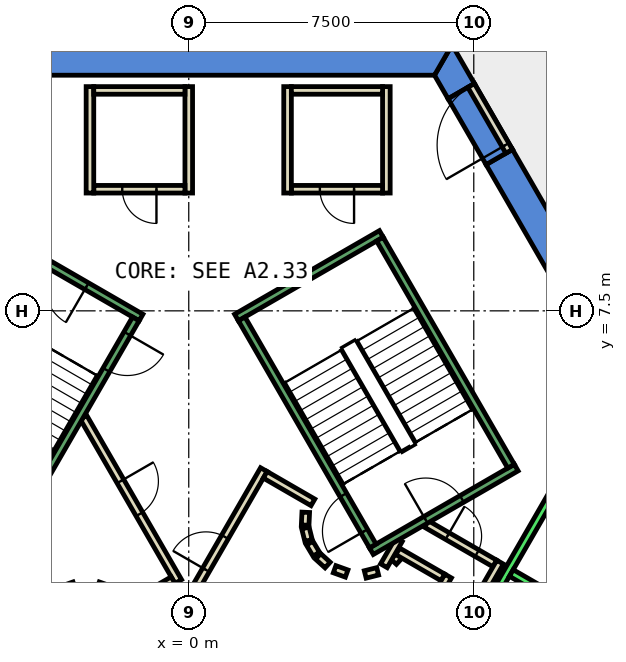
"""IFC4 building model, lengths in metres.
Left out: names, types, materials, properties, quantities, classifications, styles, units other than length and angle.
Written with IfcOpenShell. Run it as: python <this file> out.ifc"""

import sys

from ifc_helpers import new_model, si_unit, direction, frame, frame_2d, origin, place, context, subcontext, project, spatial, polyline, rectangle, outline, extrude, element, fill, save


model = new_model("IFC4")
c1 = context("Model", 3, precision=1e-05, world=origin(), true_north=direction((0.0, 1.0)))
c2 = subcontext(c1, "Body", "Model", "MODEL_VIEW")
j1 = project(units=[si_unit("LENGTHUNIT", "METRE"), si_unit("PLANEANGLEUNIT", "RADIAN")], contexts=[c1])
p1 = place(None, origin())
s1 = spatial("IfcSite", under=j1, at=p1, CompositionType="ELEMENT")
p2 = place(p1, origin())
s2 = spatial("IfcBuilding", under=s1, at=p2, CompositionType="ELEMENT")
p3 = place(p2, frame((0.0, 0.0, 163.4)))
s3 = spatial("IfcBuildingStorey", under=s2, at=p3, CompositionType="ELEMENT", Elevation=163.4)
p4 = place(p3, frame((0.0, 0.0, -0.4)))
e1 = element("IfcWall", 1, at=p4, inside=s3, PredefinedType="SHEAR", context=c2, shape_type="SweptSolid", body=[
    extrude(outline(polyline([(8.517, 11.748), (7.824, 11.348), (12.933, 2.5), (13.856, 2.5), (8.517, 11.748)])), origin(), (0.0, 0.0, 1.0), 4.2),
])
p5 = place(p3, frame((0.0, 0.0, -0.4)))
e2 = element("IfcWall", 2, at=p5, inside=s3, PredefinedType="SHEAR", context=c2, shape_type="SweptSolid", body=[
    extrude(outline(polyline([(6.824, 13.08), (7.517, 13.48), (6.928, 14.5), (6.466, 13.7), (6.824, 13.08)])), origin(), (0.0, 0.0, 1.0), 4.2),
])
p6 = place(p3, frame((0.0, 0.0, 3.6)))
e3 = element("IfcWall", 3, at=p6, inside=s3, PredefinedType="SHEAR", context=c2, shape_type="SweptSolid", body=[
    extrude(outline(polyline([(7.517, 13.48), (6.824, 13.08), (7.824, 11.348), (8.517, 11.748), (7.517, 13.48)])), origin(), (0.0, 0.0, 1.0), 0.2),
])
p7 = place(p3, frame((0.0, 0.0, -0.4)))
e4 = element("IfcWall", 4, at=p7, inside=s3, PredefinedType="SHEAR", context=c2, shape_type="SweptSolid", body=[
    extrude(outline(polyline([(6.928, 14.5), (-6.928, 14.5), (-6.466, 13.7), (6.466, 13.7), (6.928, 14.5)])), origin(), (0.0, 0.0, 1.0), 4.2),
])
p8 = place(p3, frame((5.2, 13.4, 0.0), z_axis=(0.0, 0.0, 1.0), x_axis=(0.0, -1.0, 0.0)))
e5 = element("IfcWall", 5, at=p8, inside=s3, PredefinedType="PARTITIONING", context=c2, shape_type="SweptSolid", body=[
    extrude(rectangle(XDim=2.8, YDim=0.2, at=frame_2d((1.4, 0.0))), origin(), (0.0, 0.0, 1.0), 3.8),
])
p9 = place(p3, frame((5.1, 10.7, 0.0), z_axis=(0.0, 0.0, 1.0), x_axis=(-1.0, 0.0, 0.0)))
e6 = element("IfcWall", 6, at=p9, inside=s3, PredefinedType="PARTITIONING", context=c2, shape_type="SweptSolid", body=[
    extrude(rectangle(XDim=2.4, YDim=0.2, at=frame_2d((1.2, 0.0))), origin(), (0.0, 0.0, 1.0), 3.8),
])
p10 = place(p9, frame((0.75, 0.0, 0.0)))
e7 = element("IfcOpeningElement", 7, at=p10, cuts=e6, PredefinedType="OPENING", context=c2, shape_type="SweptSolid", body=[
    extrude(rectangle(XDim=0.9, YDim=2.1, at=frame_2d((0.45, 1.05))), frame((0.0, 0.11, 0.0), z_axis=(0.0, -1.0, 0.0), x_axis=(1.0, 0.0, 0.0)), (0.0, 0.0, 1.0), 0.22),
])
p11 = place(p3, frame((2.6, 10.6, 0.0), z_axis=(0.0, 0.0, 1.0), x_axis=(0.0, 1.0, 0.0)))
e8 = element("IfcWall", 8, at=p11, inside=s3, PredefinedType="PARTITIONING", context=c2, shape_type="SweptSolid", body=[
    extrude(rectangle(XDim=2.8, YDim=0.2, at=frame_2d((1.4, 0.0))), origin(), (0.0, 0.0, 1.0), 3.8),
])
p12 = place(p3, frame((2.7, 13.3, 0.0), z_axis=(0.0, 0.0, 1.0), x_axis=(1.0, 0.0, 0.0)))
e9 = element("IfcWall", 9, at=p12, inside=s3, PredefinedType="PARTITIONING", context=c2, shape_type="SweptSolid", body=[
    extrude(rectangle(XDim=2.4, YDim=0.2, at=frame_2d((1.2, 0.0))), origin(), (0.0, 0.0, 1.0), 3.8),
])
p13 = place(p3, frame((0.0, 13.4, 0.0), z_axis=(0.0, 0.0, 1.0), x_axis=(0.0, -1.0, 0.0)))
e10 = element("IfcWall", 10, at=p13, inside=s3, PredefinedType="PARTITIONING", context=c2, shape_type="SweptSolid", body=[
    extrude(rectangle(XDim=2.8, YDim=0.2, at=frame_2d((1.4, 0.0))), origin(), (0.0, 0.0, 1.0), 3.8),
])
p14 = place(p3, frame((-0.1, 10.7, 0.0), z_axis=(0.0, 0.0, 1.0), x_axis=(-1.0, 0.0, 0.0)))
e11 = element("IfcWall", 11, at=p14, inside=s3, PredefinedType="PARTITIONING", context=c2, shape_type="SweptSolid", body=[
    extrude(rectangle(XDim=2.4, YDim=0.2, at=frame_2d((1.2, 0.0))), origin(), (0.0, 0.0, 1.0), 3.8),
])
p15 = place(p14, frame((0.75, 0.0, 0.0)))
e12 = element("IfcOpeningElement", 12, at=p15, cuts=e11, PredefinedType="OPENING", context=c2, shape_type="SweptSolid", body=[
    extrude(rectangle(XDim=0.9, YDim=2.1, at=frame_2d((0.45, 1.05))), frame((0.0, 0.11, 0.0), z_axis=(0.0, -1.0, 0.0), x_axis=(1.0, 0.0, 0.0)), (0.0, 0.0, 1.0), 0.22),
])
p16 = place(p3, frame((-2.6, 10.6, 0.0), z_axis=(0.0, 0.0, 1.0), x_axis=(0.0, 1.0, 0.0)))
e13 = element("IfcWall", 13, at=p16, inside=s3, PredefinedType="PARTITIONING", context=c2, shape_type="SweptSolid", body=[
    extrude(rectangle(XDim=2.8, YDim=0.2, at=frame_2d((1.4, 0.0))), origin(), (0.0, 0.0, 1.0), 3.8),
])
p17 = place(p3, frame((-2.5, 13.3, 0.0), z_axis=(0.0, 0.0, 1.0), x_axis=(1.0, 0.0, 0.0)))
e14 = element("IfcWall", 14, at=p17, inside=s3, PredefinedType="PARTITIONING", context=c2, shape_type="SweptSolid", body=[
    extrude(rectangle(XDim=2.4, YDim=0.2, at=frame_2d((1.2, 0.0))), origin(), (0.0, 0.0, 1.0), 3.8),
])
p18 = place(p3, frame((5.39, 0.898, 0.0), z_axis=(0.0, 0.0, 1.0), x_axis=(0.673828488714, 0.738887791073, 0.0)))
e15 = element("IfcWall", 15, at=p18, inside=s3, PredefinedType="PARTITIONING", context=c2, shape_type="SweptSolid", body=[
    extrude(rectangle(XDim=0.263, YDim=0.2, at=frame_2d((0.131, 0.0))), origin(), (0.0, 0.0, 1.0), 3.8),
])
p19 = place(p3, frame((5.499, 1.172, 0.0), z_axis=(0.0, 0.0, 1.0), x_axis=(0.866333505267, -0.499465972466, 0.0)))
e16 = element("IfcWall", 16, at=p19, inside=s3, PredefinedType="PARTITIONING", context=c2, shape_type="SweptSolid", body=[
    extrude(rectangle(XDim=1.374, YDim=0.2, at=frame_2d((0.687, 0.0))), origin(), (0.0, 0.0, 1.0), 3.8),
])
p20 = place(p3, frame((6.826, 0.522, 0.0), z_axis=(0.0, 0.0, 1.0), x_axis=(-0.500016722714, -0.866015748706, 0.0)))
e17 = element("IfcWall", 17, at=p20, inside=s3, PredefinedType="PARTITIONING", context=c2, shape_type="SweptSolid", body=[
    extrude(rectangle(XDim=1.7, YDim=0.2, at=frame_2d((0.85, 0.0))), origin(), (0.0, 0.0, 1.0), 3.8),
])
p21 = place(p3, frame((6.25, 1.894, 0.0), z_axis=(0.0, 0.0, 1.0), x_axis=(0.866043184279, -0.499969202016, 0.0)))
e18 = element("IfcWall", 18, at=p21, inside=s3, PredefinedType="PARTITIONING", context=c2, shape_type="SweptSolid", body=[
    extrude(rectangle(XDim=2.084, YDim=0.2, at=frame_2d((1.042, 0.0))), origin(), (0.0, 0.0, 1.0), 3.8),
])
p22 = place(p21, frame((0.642, 0.0, 0.0)))
e19 = element("IfcOpeningElement", 19, at=p22, cuts=e18, PredefinedType="OPENING", context=c2, shape_type="SweptSolid", body=[
    extrude(rectangle(XDim=0.9, YDim=2.1, at=frame_2d((0.45, 1.05))), frame((0.0, 0.11, 0.0), z_axis=(0.0, -1.0, 0.0), x_axis=(1.0, 0.0, 0.0)), (0.0, 0.0, 1.0), 0.22),
])
p23 = place(p3, frame((8.192, 0.888, 0.0), z_axis=(0.0, 0.0, 1.0), x_axis=(-0.499940625693, -0.866059680843, 0.0)))
e20 = element("IfcWall", 20, at=p23, inside=s3, PredefinedType="PARTITIONING", context=c2, shape_type="SweptSolid", body=[
    extrude(rectangle(XDim=2.68, YDim=0.2, at=frame_2d((1.34, 0.0))), origin(), (0.0, 0.0, 1.0), 3.8),
])
p24 = place(p3, frame((5.135, 0.793, 0.0), z_axis=(0.0, 0.0, 1.0), x_axis=(0.499526442893, 0.866298639529, 0.0)))
e21 = element("IfcWall", 21, at=p24, inside=s3, PredefinedType="PARTITIONING", context=c2, shape_type="SweptSolid", body=[
    extrude(rectangle(XDim=0.791, YDim=0.2, at=frame_2d((0.396, 0.0))), origin(), (0.0, 0.0, 1.0), 3.8),
])
p25 = place(p3, frame((-0.52, -1.0, 0.0), z_axis=(0.0, 0.0, 1.0), x_axis=(0.50011622646, 0.865958290007, 0.0)))
e22 = element("IfcWall", 22, at=p25, inside=s3, PredefinedType="PARTITIONING", context=c2, shape_type="SweptSolid", body=[
    extrude(rectangle(XDim=4.991, YDim=0.2, at=frame_2d((2.496, 0.0))), origin(), (0.0, 0.0, 1.0), 3.8),
])
p26 = place(p25, frame((1.945, 0.0, 0.0)))
e23 = element("IfcOpeningElement", 23, at=p26, cuts=e22, PredefinedType="OPENING", context=c2, shape_type="SweptSolid", body=[
    extrude(rectangle(XDim=1.0, YDim=2.1, at=frame_2d((0.5, 1.05))), frame((0.0, 0.11, 0.0), z_axis=(0.0, -1.0, 0.0), x_axis=(1.0, 0.0, 0.0)), (0.0, 0.0, 1.0), 0.22),
])
p27 = place(p3, frame((2.012, 3.186, 0.0), z_axis=(0.0, 0.0, 1.0), x_axis=(0.865891012941, -0.500232699559, 0.0)))
e24 = element("IfcWall", 24, at=p27, inside=s3, PredefinedType="PARTITIONING", context=c2, shape_type="SweptSolid", body=[
    extrude(rectangle(XDim=1.449, YDim=0.2, at=frame_2d((0.725, 0.0))), origin(), (0.0, 0.0, 1.0), 3.8),
])
p28 = place(p3, frame((3.079, 2.199, 0.0), z_axis=(0.0, 0.0, 1.0), x_axis=(-0.047771483479, -0.998858290933, 0.0)))
e25 = element("IfcWall", 25, at=p28, inside=s3, PredefinedType="PARTITIONING", context=c2, shape_type="SweptSolid", body=[
    extrude(rectangle(XDim=0.337, YDim=0.2, at=frame_2d((0.169, 0.0))), origin(), (0.0, 0.0, 1.0), 3.8),
])
p29 = place(p3, frame((3.07, 1.786, 0.0), z_axis=(0.0, 0.0, 1.0), x_axis=(0.242705583207, -0.970099994784, 0.0)))
e26 = element("IfcWall", 26, at=p29, inside=s3, PredefinedType="PARTITIONING", context=c2, shape_type="SweptSolid", body=[
    extrude(rectangle(XDim=0.338, YDim=0.2, at=frame_2d((0.169, 0.0))), origin(), (0.0, 0.0, 1.0), 3.8),
])
for number, where, z_axis, x_axis in (
    (27, (3.182, 1.388, 0.0), (0.0, 0.0, 1.0), (0.512, -0.859, 0.0)),
    (28, (3.404, 1.039, 0.0), (0.0, 0.0, 1.0), (0.74, -0.672, 0.0)),
):
    element("IfcWall", number, at=place(p3, frame(where, z_axis=z_axis, x_axis=x_axis)), inside=s3, PredefinedType="PARTITIONING", context=c2, shape_type="SweptSolid", body=[
        extrude(rectangle(XDim=0.338, YDim=0.2, at=frame_2d((0.169, 0.0))), origin(), (0.0, 0.0, 1.0), 3.8),
    ])
p30 = place(p3, frame((3.838, 0.702, 0.0), z_axis=(0.0, 0.0, 1.0), x_axis=(0.941035081519, -0.338308993895, 0.0)))
e29 = element("IfcWall", 29, at=p30, inside=s3, PredefinedType="PARTITIONING", context=c2, shape_type="SweptSolid", body=[
    extrude(rectangle(XDim=0.337, YDim=0.2, at=frame_2d((0.168, 0.0))), origin(), (0.0, 0.0, 1.0), 3.8),
])
p31 = place(p3, frame((4.644, 0.564, 0.0), z_axis=(0.0, 0.0, 1.0), x_axis=(0.969929076366, 0.243387729394, 0.0)))
e30 = element("IfcWall", 30, at=p31, inside=s3, PredefinedType="PARTITIONING", context=c2, shape_type="SweptSolid", body=[
    extrude(rectangle(XDim=0.337, YDim=0.2, at=frame_2d((0.168, 0.0))), origin(), (0.0, 0.0, 1.0), 3.8),
])
p32 = place(p3, frame((-2.771, 4.7, 0.0), z_axis=(0.0, 0.0, 1.0), x_axis=(0.499969479948, -0.866043023828, 0.0)))
e31 = element("IfcWall", 31, at=p32, inside=s3, PredefinedType="PARTITIONING", context=c2, shape_type="SweptSolid", body=[
    extrude(rectangle(XDim=4.99, YDim=0.2, at=frame_2d((2.495, 0.0))), origin(), (0.0, 0.0, 1.0), 3.8),
])
p33 = place(p32, frame((1.945, 0.0, 0.0)))
e32 = element("IfcOpeningElement", 32, at=p33, cuts=e31, PredefinedType="OPENING", context=c2, shape_type="SweptSolid", body=[
    extrude(rectangle(XDim=1.0, YDim=2.1, at=frame_2d((0.5, 1.05))), frame((0.0, 0.11, 0.0), z_axis=(0.0, -1.0, 0.0), x_axis=(1.0, 0.0, 0.0)), (0.0, 0.0, 1.0), 0.22),
])
p34 = place(p3, frame((-0.412, 0.414, 0.0), z_axis=(0.0, 0.0, 1.0), x_axis=(-0.866017369001, -0.500013916395, 0.0)))
e33 = element("IfcWall", 33, at=p34, inside=s3, PredefinedType="PARTITIONING", context=c2, shape_type="SweptSolid", body=[
    extrude(rectangle(XDim=1.45, YDim=0.2, at=frame_2d((0.725, 0.0))), origin(), (0.0, 0.0, 1.0), 3.8),
])
p35 = place(p3, frame((-2.07, 0.16, 0.0), z_axis=(0.0, 0.0, 1.0), x_axis=(-0.942199461132, 0.335052496547, 0.0)))
e34 = element("IfcWall", 34, at=p35, inside=s3, PredefinedType="PARTITIONING", context=c2, shape_type="SweptSolid", body=[
    extrude(rectangle(XDim=0.337, YDim=0.2, at=frame_2d((0.169, 0.0))), origin(), (0.0, 0.0, 1.0), 3.8),
])
p36 = place(p3, frame((-3.012, 0.273, 0.0), z_axis=(0.0, 0.0, 1.0), x_axis=(-0.942280615813, -0.334824194261, 0.0)))
e35 = element("IfcWall", 35, at=p36, inside=s3, PredefinedType="PARTITIONING", context=c2, shape_type="SweptSolid", body=[
    extrude(rectangle(XDim=0.338, YDim=0.2, at=frame_2d((0.169, 0.0))), origin(), (0.0, 0.0, 1.0), 3.8),
])
p37 = place(p3, frame((8.43, 11.698, 0.0), z_axis=(0.0, 0.0, 1.0), x_axis=(-0.50002537861, 0.866010750942, 0.0)))
e36 = element("IfcWall", 36, at=p37, inside=s3, PredefinedType="PARTITIONING", context=c2, shape_type="SweptSolid", body=[
    extrude(rectangle(XDim=2.0, YDim=0.2, at=frame_2d((1.0, 0.0))), origin(), (0.0, 0.0, 1.0), 2.4),
])
p38 = place(p37, frame((0.19, 0.0, 0.0)))
e37 = element("IfcOpeningElement", 37, at=p38, cuts=e36, PredefinedType="OPENING", context=c2, shape_type="SweptSolid", body=[
    extrude(rectangle(XDim=1.8, YDim=2.1, at=frame_2d((0.9, 1.05))), frame((0.0, 0.11, 0.0), z_axis=(0.0, -1.0, 0.0), x_axis=(1.0, 0.0, 0.0)), (0.0, 0.0, 1.0), 0.22),
])
p39 = place(p3, frame((4.451, -6.19, 0.0), z_axis=(0.0, 0.0, 1.0), x_axis=(0.50000090737, 0.866024879913, 0.0)))
e38 = element("IfcWall", 38, at=p39, inside=s3, PredefinedType="STANDARD", context=c2, shape_type="SweptSolid", body=[
    extrude(rectangle(XDim=10.6, YDim=0.2, at=frame_2d((5.3, 0.0))), origin(), (0.0, 0.0, 1.0), 3.8),
])
p40 = place(p3, frame((8.488, 0.602, 0.0), z_axis=(0.0, 0.0, 1.0), x_axis=(0.866022959057, -0.500004234368, 0.0)))
e39 = element("IfcWall", 39, at=p40, inside=s3, PredefinedType="STANDARD", context=c2, shape_type="SweptSolid", body=[
    extrude(rectangle(XDim=2.5, YDim=0.2, at=frame_2d((1.25, 0.0))), origin(), (0.0, 0.0, 1.0), 3.8),
])
p41 = place(p3, frame((4.806, 1.176, 0.0), z_axis=(0.0, 0.0, 1.0), x_axis=(0.866059941101, 0.499940174841, 0.0)))
e40 = element("IfcWall", 40, at=p41, inside=s3, PredefinedType="STANDARD", context=c2, shape_type="SweptSolid", body=[
    extrude(rectangle(XDim=4.4, YDim=0.2, at=frame_2d((2.2, 0.0))), origin(), (0.0, 0.0, 1.0), 3.8),
])
p42 = place(p41, frame((1.65, 0.0, 0.0)))
e41 = element("IfcOpeningElement", 41, at=p42, cuts=e40, PredefinedType="OPENING", context=c2, shape_type="SweptSolid", body=[
    extrude(rectangle(XDim=1.1, YDim=2.2, at=frame_2d((0.55, 1.1))), frame((0.0, 0.11, 0.0), z_axis=(0.0, -1.0, 0.0), x_axis=(1.0, 0.0, 0.0)), (0.0, 0.0, 1.0), 0.22),
])
p43 = place(p3, frame((1.256, 7.324, 0.0), z_axis=(0.0, 0.0, 1.0), x_axis=(0.866046073146, 0.499964197906, 0.0)))
e42 = element("IfcWall", 42, at=p43, inside=s3, PredefinedType="STANDARD", context=c2, shape_type="SweptSolid", body=[
    extrude(rectangle(XDim=4.4, YDim=0.2, at=frame_2d((2.2, 0.0))), origin(), (0.0, 0.0, 1.0), 3.8),
])
p44 = place(p3, frame((4.843, 1.312, 0.0), z_axis=(0.0, 0.0, 1.0), x_axis=(-0.499963383562, 0.866046543262, 0.0)))
e43 = element("IfcWall", 43, at=p44, inside=s3, PredefinedType="STANDARD", context=c2, shape_type="SweptSolid", body=[
    extrude(rectangle(XDim=6.9, YDim=0.2, at=frame_2d((3.45, 0.0))), origin(), (0.0, 0.0, 1.0), 3.8),
])
p45 = place(p44, frame((0.45, 0.0, 0.0)))
e44 = element("IfcOpeningElement", 44, at=p45, cuts=e43, PredefinedType="OPENING", context=c2, shape_type="SweptSolid", body=[
    extrude(rectangle(XDim=1.1, YDim=2.2, at=frame_2d((0.55, 1.1))), frame((0.0, 0.11, 0.0), z_axis=(0.0, -1.0, 0.0), x_axis=(1.0, 0.0, 0.0)), (0.0, 0.0, 1.0), 0.22),
])
p46 = place(p3, frame((8.48, 3.412, 0.0), z_axis=(0.0, 0.0, 1.0), x_axis=(-0.499978703459, 0.866037698999, 0.0)))
e45 = element("IfcWall", 45, at=p46, inside=s3, PredefinedType="STANDARD", context=c2, shape_type="SweptSolid", body=[
    extrude(rectangle(XDim=6.9, YDim=0.2, at=frame_2d((3.45, 0.0))), origin(), (0.0, 0.0, 1.0), 3.8),
])
p47 = place(p3, frame((-1.256, 7.324, 0.0), z_axis=(0.0, 0.0, 1.0), x_axis=(-0.866046073146, 0.499964197906, 0.0)))
e46 = element("IfcWall", 46, at=p47, inside=s3, PredefinedType="STANDARD", context=c2, shape_type="SweptSolid", body=[
    extrude(rectangle(XDim=4.4, YDim=0.2, at=frame_2d((2.2, 0.0))), origin(), (0.0, 0.0, 1.0), 3.8),
])
p48 = place(p47, frame((1.65, 0.0, 0.0)))
e47 = element("IfcOpeningElement", 47, at=p48, cuts=e46, PredefinedType="OPENING", context=c2, shape_type="SweptSolid", body=[
    extrude(rectangle(XDim=1.1, YDim=2.2, at=frame_2d((0.55, 1.1))), frame((0.0, 0.11, 0.0), z_axis=(0.0, -1.0, 0.0), x_axis=(1.0, 0.0, 0.0)), (0.0, 0.0, 1.0), 0.22),
])
p49 = place(p3, frame((-1.393, 7.288, 0.0), z_axis=(0.0, 0.0, 1.0), x_axis=(-0.499963383562, -0.866046543262, 0.0)))
e48 = element("IfcWall", 48, at=p49, inside=s3, PredefinedType="STANDARD", context=c2, shape_type="SweptSolid", body=[
    extrude(rectangle(XDim=6.9, YDim=0.2, at=frame_2d((3.45, 0.0))), origin(), (0.0, 0.0, 1.0), 3.8),
])
p50 = place(p49, frame((0.45, 0.0, 0.0)))
e49 = element("IfcOpeningElement", 49, at=p50, cuts=e48, PredefinedType="OPENING", context=c2, shape_type="SweptSolid", body=[
    extrude(rectangle(XDim=1.1, YDim=2.2, at=frame_2d((0.55, 1.1))), frame((0.0, 0.11, 0.0), z_axis=(0.0, -1.0, 0.0), x_axis=(1.0, 0.0, 0.0)), (0.0, 0.0, 1.0), 0.22),
])
p51 = place(p26, origin())
e50 = element("IfcDoor", 50, at=p51, inside=s3, OperationType="SINGLE_SWING_LEFT", PredefinedType="DOOR", context=c2, shape_type="SweptSolid", body=[
    extrude(rectangle(XDim=1.0, YDim=2.1, at=frame_2d((0.5, 1.05))), frame((0.0, 0.025, 0.0), z_axis=(0.0, -1.0, 0.0), x_axis=(1.0, 0.0, 0.0)), (0.0, 0.0, 1.0), 0.05),
])
fill(e23, e50)
p52 = place(p33, origin())
e51 = element("IfcDoor", 51, at=p52, inside=s3, OperationType="SINGLE_SWING_RIGHT", PredefinedType="DOOR", context=c2, shape_type="SweptSolid", body=[
    extrude(rectangle(XDim=1.0, YDim=2.1, at=frame_2d((0.5, 1.05))), frame((0.0, 0.025, 0.0), z_axis=(0.0, -1.0, 0.0), x_axis=(1.0, 0.0, 0.0)), (0.0, 0.0, 1.0), 0.05),
])
fill(e32, e51)
p53 = place(p10, origin())
e52 = element("IfcDoor", 52, at=p53, inside=s3, OperationType="SINGLE_SWING_RIGHT", PredefinedType="DOOR", context=c2, shape_type="SweptSolid", body=[
    extrude(rectangle(XDim=0.9, YDim=2.1, at=frame_2d((0.45, 1.05))), frame((0.0, 0.025, 0.0), z_axis=(0.0, -1.0, 0.0), x_axis=(1.0, 0.0, 0.0)), (0.0, 0.0, 1.0), 0.05),
])
fill(e7, e52)
p54 = place(p15, origin())
e53 = element("IfcDoor", 53, at=p54, inside=s3, OperationType="SINGLE_SWING_RIGHT", PredefinedType="DOOR", context=c2, shape_type="SweptSolid", body=[
    extrude(rectangle(XDim=0.9, YDim=2.1, at=frame_2d((0.45, 1.05))), frame((0.0, 0.025, 0.0), z_axis=(0.0, -1.0, 0.0), x_axis=(1.0, 0.0, 0.0)), (0.0, 0.0, 1.0), 0.05),
])
fill(e12, e53)
p55 = place(p22, origin())
e54 = element("IfcDoor", 54, at=p55, inside=s3, OperationType="SINGLE_SWING_LEFT", PredefinedType="DOOR", context=c2, shape_type="SweptSolid", body=[
    extrude(rectangle(XDim=0.9, YDim=2.1, at=frame_2d((0.45, 1.05))), frame((0.0, 0.025, 0.0), z_axis=(0.0, -1.0, 0.0), x_axis=(1.0, 0.0, 0.0)), (0.0, 0.0, 1.0), 0.05),
])
fill(e19, e54)
p56 = place(p38, origin())
e55 = element("IfcDoor", 55, at=p56, inside=s3, OperationType="DOUBLE_DOOR_SINGLE_SWING", PredefinedType="DOOR", context=c2, shape_type="SweptSolid", body=[
    extrude(rectangle(XDim=1.8, YDim=2.1, at=frame_2d((0.9, 1.05))), frame((0.0, 0.025, 0.0), z_axis=(0.0, -1.0, 0.0), x_axis=(1.0, 0.0, 0.0)), (0.0, 0.0, 1.0), 0.05),
])
fill(e37, e55)
p57 = place(p45, origin())
e56 = element("IfcDoor", 56, at=p57, inside=s3, OperationType="SINGLE_SWING_LEFT", PredefinedType="DOOR", context=c2, shape_type="SweptSolid", body=[
    extrude(rectangle(XDim=1.1, YDim=2.2, at=frame_2d((0.55, 1.1))), frame((0.0, 0.025, 0.0), z_axis=(0.0, -1.0, 0.0), x_axis=(1.0, 0.0, 0.0)), (0.0, 0.0, 1.0), 0.05),
])
fill(e44, e56)
p58 = place(p42, origin())
e57 = element("IfcDoor", 57, at=p58, inside=s3, OperationType="SINGLE_SWING_LEFT", PredefinedType="DOOR", context=c2, shape_type="SweptSolid", body=[
    extrude(rectangle(XDim=1.1, YDim=2.2, at=frame_2d((0.55, 1.1))), frame((0.0, 0.025, 0.0), z_axis=(0.0, -1.0, 0.0), x_axis=(1.0, 0.0, 0.0)), (0.0, 0.0, 1.0), 0.05),
])
fill(e41, e57)
p59 = place(p50, origin())
e58 = element("IfcDoor", 58, at=p59, inside=s3, OperationType="SINGLE_SWING_LEFT", PredefinedType="DOOR", context=c2, shape_type="SweptSolid", body=[
    extrude(rectangle(XDim=1.1, YDim=2.2, at=frame_2d((0.55, 1.1))), frame((0.0, 0.025, 0.0), z_axis=(0.0, -1.0, 0.0), x_axis=(1.0, 0.0, 0.0)), (0.0, 0.0, 1.0), 0.05),
])
fill(e49, e58)
p60 = place(p48, origin())
e59 = element("IfcDoor", 59, at=p60, inside=s3, OperationType="SINGLE_SWING_LEFT", PredefinedType="DOOR", context=c2, shape_type="SweptSolid", body=[
    extrude(rectangle(XDim=1.1, YDim=2.2, at=frame_2d((0.55, 1.1))), frame((0.0, 0.025, 0.0), z_axis=(0.0, -1.0, 0.0), x_axis=(1.0, 0.0, 0.0)), (0.0, 0.0, 1.0), 0.05),
])
fill(e47, e59)
save(model, sys.argv[1])
